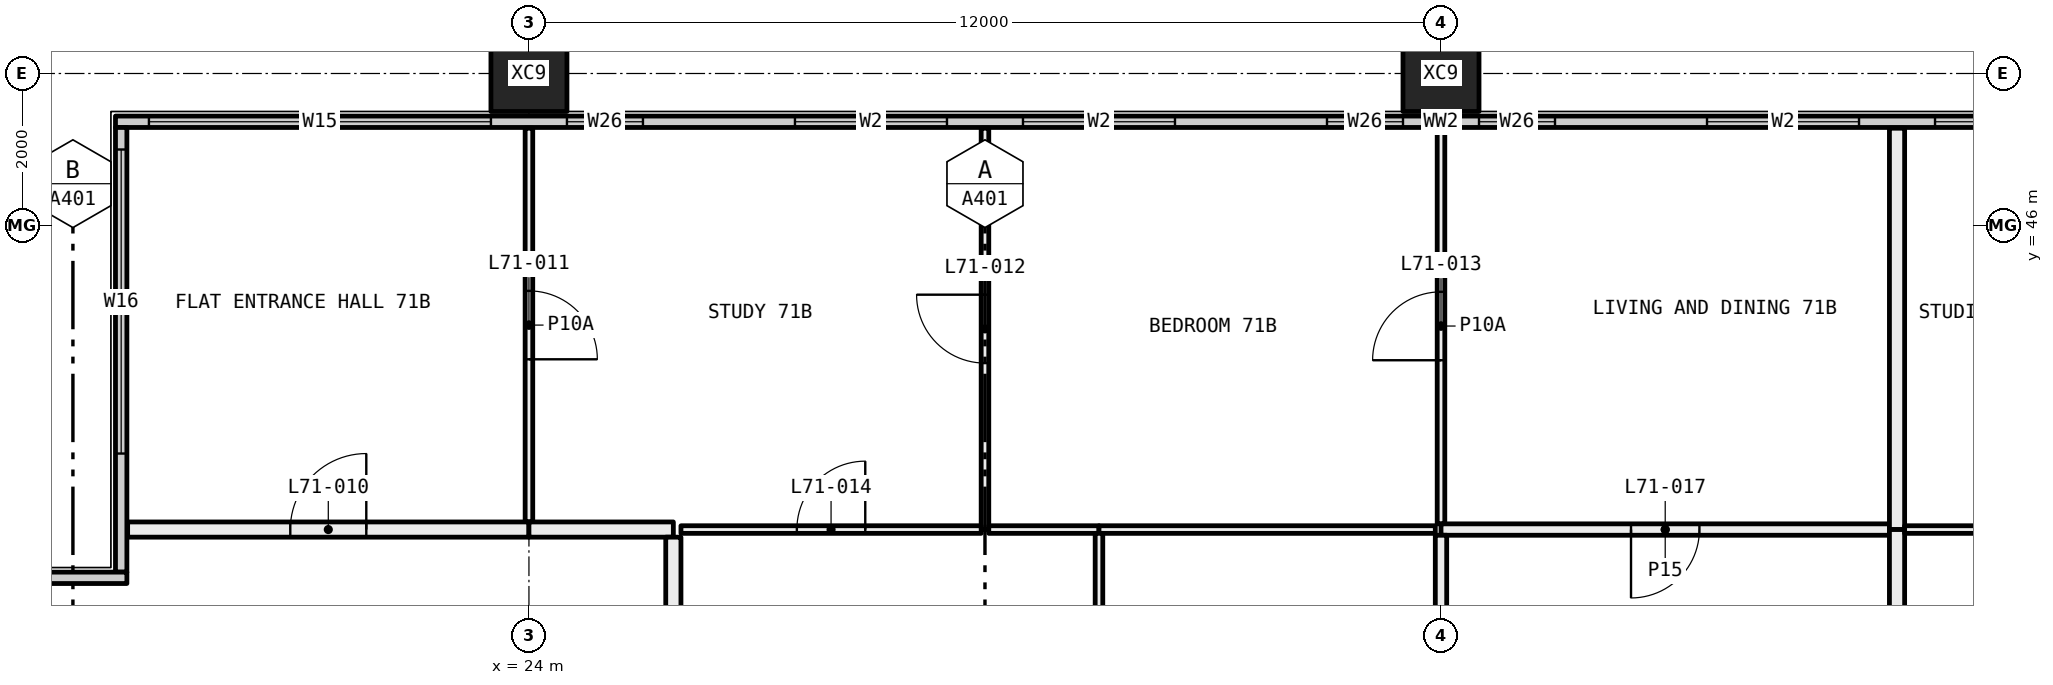
"""IFC4 building model, lengths in metres.
Left out: names, types, materials, properties, quantities, classifications, styles, units other than length and angle.
Written with IfcOpenShell. Run it as: python <this file> out.ifc"""

import sys

from ifc_helpers import new_model, si_unit, direction, frame, frame_2d, origin, origin_2d, place, context, subcontext, project, spatial, rectangle, hollow_rectangle, extrude, element, fill, save


model = new_model("IFC4")
c1 = context("Model", 3, precision=1e-05, world=origin(), true_north=direction((0.0, 1.0)))
c2 = subcontext(c1, "Body", "Model", "MODEL_VIEW")
j1 = project(units=[si_unit("LENGTHUNIT", "METRE"), si_unit("PLANEANGLEUNIT", "RADIAN")], contexts=[c1])
p1 = place(None, origin())
s1 = spatial("IfcSite", under=j1, at=p1, CompositionType="ELEMENT")
p2 = place(p1, origin())
s2 = spatial("IfcBuilding", under=s1, at=p2, CompositionType="ELEMENT")
p3 = place(p2, frame((0.0, 0.0, 262.8)))
s3 = spatial("IfcBuildingStorey", under=s2, at=p3, CompositionType="ELEMENT", Elevation=262.8)
for number, where, z_axis, x_axis in (
    (1, (24.0, 48.0, -0.4), (0.0, 0.0, 1.0), (1.0, 0.0, 0.0)),
    (2, (36.0, 48.0, -0.4), (0.0, 0.0, 1.0), (1.0, 0.0, 0.0)),
):
    element("IfcColumn", number, at=place(p3, frame(where, z_axis=z_axis, x_axis=x_axis)), inside=s3, PredefinedType="COLUMN", context=c2, shape_type="SweptSolid", body=[
        extrude(hollow_rectangle(XDim=1.0, YDim=1.0, WallThickness=0.036, at=origin_2d()), origin(), (0.0, 0.0, 1.0), 3.45),
    ])
p4 = place(p3, frame((18.56, 47.365, 0.0), z_axis=(0.0, 0.0, 1.0), x_axis=(1.0, 0.0, 0.0)))
e3 = element("IfcWall", 3, at=p4, inside=s3, PredefinedType="ELEMENTEDWALL", context=c2, shape_type="SweptSolid", body=[
    extrude(rectangle(XDim=34.88, YDim=0.15, at=frame_2d((17.44, 0.0))), origin(), (0.0, 0.0, 1.0), 3.05),
])
p5 = place(p4, frame((0.44, 0.0, 0.45)))
e4 = element("IfcOpeningElement", 4, at=p5, cuts=e3, PredefinedType="OPENING", context=c2, shape_type="SweptSolid", body=[
    extrude(rectangle(XDim=4.5, YDim=2.55, at=frame_2d((2.25, 1.275))), frame((0.0, 0.085, 0.0), z_axis=(0.0, -1.0, 0.0), x_axis=(1.0, 0.0, 0.0)), (0.0, 0.0, 1.0), 0.17),
])
p6 = place(p4, frame((5.94, 0.0, 0.45)))
e5 = element("IfcOpeningElement", 5, at=p6, cuts=e3, PredefinedType="OPENING", context=c2, shape_type="SweptSolid", body=[
    extrude(rectangle(XDim=1.0, YDim=2.55, at=frame_2d((0.5, 1.275))), frame((0.0, 0.085, 0.0), z_axis=(0.0, -1.0, 0.0), x_axis=(1.0, 0.0, 0.0)), (0.0, 0.0, 1.0), 0.17),
])
p7 = place(p4, frame((8.94, 0.0, 0.45)))
e6 = element("IfcOpeningElement", 6, at=p7, cuts=e3, PredefinedType="OPENING", context=c2, shape_type="SweptSolid", body=[
    extrude(rectangle(XDim=2.0, YDim=2.55, at=frame_2d((1.0, 1.275))), frame((0.0, 0.085, 0.0), z_axis=(0.0, -1.0, 0.0), x_axis=(1.0, 0.0, 0.0)), (0.0, 0.0, 1.0), 0.17),
])
p8 = place(p4, frame((11.94, 0.0, 0.45)))
e7 = element("IfcOpeningElement", 7, at=p8, cuts=e3, PredefinedType="OPENING", context=c2, shape_type="SweptSolid", body=[
    extrude(rectangle(XDim=2.0, YDim=2.55, at=frame_2d((1.0, 1.275))), frame((0.0, 0.085, 0.0), z_axis=(0.0, -1.0, 0.0), x_axis=(1.0, 0.0, 0.0)), (0.0, 0.0, 1.0), 0.17),
])
p9 = place(p4, frame((15.94, 0.0, 0.45)))
e8 = element("IfcOpeningElement", 8, at=p9, cuts=e3, PredefinedType="OPENING", context=c2, shape_type="SweptSolid", body=[
    extrude(rectangle(XDim=1.0, YDim=2.55, at=frame_2d((0.5, 1.275))), frame((0.0, 0.085, 0.0), z_axis=(0.0, -1.0, 0.0), x_axis=(1.0, 0.0, 0.0)), (0.0, 0.0, 1.0), 0.17),
])
p10 = place(p4, frame((17.94, 0.0, 0.45)))
e9 = element("IfcOpeningElement", 9, at=p10, cuts=e3, PredefinedType="OPENING", context=c2, shape_type="SweptSolid", body=[
    extrude(rectangle(XDim=1.0, YDim=2.55, at=frame_2d((0.5, 1.275))), frame((0.0, 0.085, 0.0), z_axis=(0.0, -1.0, 0.0), x_axis=(1.0, 0.0, 0.0)), (0.0, 0.0, 1.0), 0.17),
])
p11 = place(p4, frame((20.94, 0.0, 0.45)))
e10 = element("IfcOpeningElement", 10, at=p11, cuts=e3, PredefinedType="OPENING", context=c2, shape_type="SweptSolid", body=[
    extrude(rectangle(XDim=2.0, YDim=2.55, at=frame_2d((1.0, 1.275))), frame((0.0, 0.085, 0.0), z_axis=(0.0, -1.0, 0.0), x_axis=(1.0, 0.0, 0.0)), (0.0, 0.0, 1.0), 0.17),
])
p12 = place(p4, frame((23.94, 0.0, 0.45)))
e11 = element("IfcOpeningElement", 11, at=p12, cuts=e3, PredefinedType="OPENING", context=c2, shape_type="SweptSolid", body=[
    extrude(rectangle(XDim=2.0, YDim=2.55, at=frame_2d((1.0, 1.275))), frame((0.0, 0.085, 0.0), z_axis=(0.0, -1.0, 0.0), x_axis=(1.0, 0.0, 0.0)), (0.0, 0.0, 1.0), 0.17),
])
p13 = place(p4, frame((27.94, 0.0, 0.45)))
e12 = element("IfcOpeningElement", 12, at=p13, cuts=e3, PredefinedType="OPENING", context=c2, shape_type="SweptSolid", body=[
    extrude(rectangle(XDim=1.0, YDim=2.55, at=frame_2d((0.5, 1.275))), frame((0.0, 0.085, 0.0), z_axis=(0.0, -1.0, 0.0), x_axis=(1.0, 0.0, 0.0)), (0.0, 0.0, 1.0), 0.17),
])
p14 = place(p4, frame((29.94, 0.0, 0.45)))
e13 = element("IfcOpeningElement", 13, at=p14, cuts=e3, PredefinedType="OPENING", context=c2, shape_type="SweptSolid", body=[
    extrude(rectangle(XDim=4.5, YDim=2.55, at=frame_2d((2.25, 1.275))), frame((0.0, 0.085, 0.0), z_axis=(0.0, -1.0, 0.0), x_axis=(1.0, 0.0, 0.0)), (0.0, 0.0, 1.0), 0.17),
])
p15 = place(p3, frame((18.635, 41.44, 0.0), z_axis=(0.0, 0.0, 1.0), x_axis=(0.0, 1.0, 0.0)))
e14 = element("IfcWall", 14, at=p15, inside=s3, PredefinedType="ELEMENTEDWALL", context=c2, shape_type="SweptSolid", body=[
    extrude(rectangle(XDim=5.85, YDim=0.15, at=frame_2d((2.925, 0.0))), origin(), (0.0, 0.0, 1.0), 3.05),
])
p16 = place(p15, frame((1.56, 0.0, 0.45)))
e15 = element("IfcOpeningElement", 15, at=p16, cuts=e14, PredefinedType="OPENING", context=c2, shape_type="SweptSolid", body=[
    extrude(rectangle(XDim=4.0, YDim=2.55, at=frame_2d((2.0, 1.275))), frame((0.0, 0.085, 0.0), z_axis=(0.0, -1.0, 0.0), x_axis=(1.0, 0.0, 0.0)), (0.0, 0.0, 1.0), 0.17),
])
p17 = place(p3, frame((12.56, 41.365, 0.0), z_axis=(0.0, 0.0, 1.0), x_axis=(1.0, 0.0, 0.0)))
e16 = element("IfcWall", 16, at=p17, inside=s3, PredefinedType="ELEMENTEDWALL", context=c2, shape_type="SweptSolid", body=[
    extrude(rectangle(XDim=6.15, YDim=0.15, at=frame_2d((3.075, 0.0))), origin(), (0.0, 0.0, 1.0), 3.05),
])
p18 = place(p17, frame((0.44, 0.0, 0.45)))
e17 = element("IfcOpeningElement", 17, at=p18, cuts=e16, PredefinedType="OPENING", context=c2, shape_type="SweptSolid", body=[
    extrude(rectangle(XDim=4.0, YDim=2.55, at=frame_2d((2.0, 1.275))), frame((0.0, 0.085, 0.0), z_axis=(0.0, -1.0, 0.0), x_axis=(1.0, 0.0, 0.0)), (0.0, 0.0, 1.0), 0.17),
])
p19 = place(p3, frame((24.0, 42.1, 0.0), z_axis=(0.0, 0.0, 1.0), x_axis=(0.0, 1.0, 0.0)))
e18 = element("IfcWall", 18, at=p19, inside=s3, PredefinedType="PARTITIONING", context=c2, shape_type="SweptSolid", body=[
    extrude(rectangle(XDim=5.18, YDim=0.1, at=frame_2d((2.59, 0.0))), origin(), (0.0, 0.0, 1.0), 3.05),
])
p20 = place(p19, frame((2.14, 0.0, 0.0)))
e19 = element("IfcOpeningElement", 19, at=p20, cuts=e18, PredefinedType="OPENING", context=c2, shape_type="SweptSolid", body=[
    extrude(rectangle(XDim=0.9, YDim=2.1, at=frame_2d((0.45, 1.05))), frame((0.0, 0.06, 0.0), z_axis=(0.0, -1.0, 0.0), x_axis=(1.0, 0.0, 0.0)), (0.0, 0.0, 1.0), 0.12),
])
p21 = place(p3, frame((18.72, 42.0, 0.0), z_axis=(0.0, 0.0, 1.0), x_axis=(1.0, 0.0, 0.0)))
e20 = element("IfcWall", 20, at=p21, inside=s3, PredefinedType="PARTITIONING", context=c2, shape_type="SweptSolid", body=[
    extrude(rectangle(XDim=5.28, YDim=0.2, at=frame_2d((2.64, 0.0))), origin(), (0.0, 0.0, 1.0), 3.05),
])
p22 = place(p21, frame((2.14, 0.0, 0.0)))
e21 = element("IfcOpeningElement", 21, at=p22, cuts=e20, PredefinedType="OPENING", context=c2, shape_type="SweptSolid", body=[
    extrude(rectangle(XDim=1.0, YDim=2.1, at=frame_2d((0.5, 1.05))), frame((0.0, 0.11, 0.0), z_axis=(0.0, -1.0, 0.0), x_axis=(1.0, 0.0, 0.0)), (0.0, 0.0, 1.0), 0.22),
])
p23 = place(p3, frame((30.0, 42.0, 0.0), z_axis=(0.0, 0.0, 1.0), x_axis=(0.0, 1.0, 0.0)))
e22 = element("IfcWall", 22, at=p23, inside=s3, PredefinedType="PARTITIONING", context=c2, shape_type="SweptSolid", body=[
    extrude(rectangle(XDim=5.28, YDim=0.1, at=frame_2d((2.64, 0.0))), origin(), (0.0, 0.0, 1.0), 3.05),
])
p24 = place(p23, frame((2.19, 0.0, 0.0)))
e23 = element("IfcOpeningElement", 23, at=p24, cuts=e22, PredefinedType="OPENING", context=c2, shape_type="SweptSolid", body=[
    extrude(rectangle(XDim=0.9, YDim=2.1, at=frame_2d((0.45, 1.05))), frame((0.0, 0.06, 0.0), z_axis=(0.0, -1.0, 0.0), x_axis=(1.0, 0.0, 0.0)), (0.0, 0.0, 1.0), 0.12),
])
p25 = place(p3, frame((26.0, 42.0, 0.0), z_axis=(0.0, 0.0, 1.0), x_axis=(1.0, 0.0, 0.0)))
e24 = element("IfcWall", 24, at=p25, inside=s3, PredefinedType="PARTITIONING", context=c2, shape_type="SweptSolid", body=[
    extrude(rectangle(XDim=3.95, YDim=0.1, at=frame_2d((1.975, 0.0))), origin(), (0.0, 0.0, 1.0), 3.05),
])
p26 = place(p25, frame((1.525, 0.0, 0.0)))
e25 = element("IfcOpeningElement", 25, at=p26, cuts=e24, PredefinedType="OPENING", context=c2, shape_type="SweptSolid", body=[
    extrude(rectangle(XDim=0.9, YDim=2.1, at=frame_2d((0.45, 1.05))), frame((0.0, 0.06, 0.0), z_axis=(0.0, -1.0, 0.0), x_axis=(1.0, 0.0, 0.0)), (0.0, 0.0, 1.0), 0.12),
])
p27 = place(p3, frame((24.0, 42.0, 0.0), z_axis=(0.0, 0.0, 1.0), x_axis=(1.0, 0.0, 0.0)))
e26 = element("IfcWall", 26, at=p27, inside=s3, PredefinedType="PARTITIONING", context=c2, shape_type="SweptSolid", body=[
    extrude(rectangle(XDim=1.9, YDim=0.2, at=frame_2d((0.95, 0.0))), origin(), (0.0, 0.0, 1.0), 3.05),
])
p28 = place(p3, frame((36.0, 42.075, 0.0), z_axis=(0.0, 0.0, 1.0), x_axis=(0.0, 1.0, 0.0)))
e27 = element("IfcWall", 27, at=p28, inside=s3, PredefinedType="PARTITIONING", context=c2, shape_type="SweptSolid", body=[
    extrude(rectangle(XDim=5.205, YDim=0.1, at=frame_2d((2.603, 0.0))), origin(), (0.0, 0.0, 1.0), 2.45),
])
p29 = place(p28, frame((2.153, 0.0, 0.0)))
e28 = element("IfcOpeningElement", 28, at=p29, cuts=e27, PredefinedType="OPENING", context=c2, shape_type="SweptSolid", body=[
    extrude(rectangle(XDim=0.9, YDim=2.1, at=frame_2d((0.45, 1.05))), frame((0.0, 0.06, 0.0), z_axis=(0.0, -1.0, 0.0), x_axis=(1.0, 0.0, 0.0)), (0.0, 0.0, 1.0), 0.12),
])
p30 = place(p3, frame((30.05, 42.0, 0.0), z_axis=(0.0, 0.0, 1.0), x_axis=(1.0, 0.0, 0.0)))
e29 = element("IfcWall", 29, at=p30, inside=s3, PredefinedType="PARTITIONING", context=c2, shape_type="SweptSolid", body=[
    extrude(rectangle(XDim=1.45, YDim=0.1, at=frame_2d((0.725, 0.0))), origin(), (0.0, 0.0, 1.0), 3.05),
])
p31 = place(p3, frame((31.5, 42.0, 0.0), z_axis=(0.0, 0.0, 1.0), x_axis=(1.0, 0.0, 0.0)))
e30 = element("IfcWall", 30, at=p31, inside=s3, PredefinedType="PARTITIONING", context=c2, shape_type="SweptSolid", body=[
    extrude(rectangle(XDim=4.425, YDim=0.1, at=frame_2d((2.212, 0.0))), origin(), (0.0, 0.0, 1.0), 2.45),
])
p32 = place(p3, frame((36.0, 42.0, 0.0), z_axis=(0.0, 0.0, 1.0), x_axis=(1.0, 0.0, 0.0)))
e31 = element("IfcWall", 31, at=p32, inside=s3, PredefinedType="PARTITIONING", context=c2, shape_type="SweptSolid", body=[
    extrude(rectangle(XDim=5.9, YDim=0.15, at=frame_2d((2.95, 0.0))), origin(), (0.0, 0.0, 1.0), 2.45),
])
p33 = place(p32, frame((2.5, 0.0, 0.0)))
e32 = element("IfcOpeningElement", 32, at=p33, cuts=e31, PredefinedType="OPENING", context=c2, shape_type="SweptSolid", body=[
    extrude(rectangle(XDim=0.9, YDim=2.1, at=frame_2d((0.45, 1.05))), frame((0.0, 0.085, 0.0), z_axis=(0.0, -1.0, 0.0), x_axis=(1.0, 0.0, 0.0)), (0.0, 0.0, 1.0), 0.17),
])
p34 = place(p3, frame((42.0, 42.0, 0.0), z_axis=(0.0, 0.0, 1.0), x_axis=(0.0, 1.0, 0.0)))
e33 = element("IfcWall", 33, at=p34, inside=s3, PredefinedType="PARTITIONING", context=c2, shape_type="SweptSolid", body=[
    extrude(rectangle(XDim=5.28, YDim=0.2, at=frame_2d((2.64, 0.0))), origin(), (0.0, 0.0, 1.0), 3.05),
])
p35 = place(p3, frame((31.5, 36.1, 0.0), z_axis=(0.0, 0.0, 1.0), x_axis=(0.0, 1.0, 0.0)))
e34 = element("IfcWall", 34, at=p35, inside=s3, PredefinedType="PARTITIONING", context=c2, shape_type="SweptSolid", body=[
    extrude(rectangle(XDim=5.85, YDim=0.1, at=frame_2d((2.925, 0.0))), origin(), (0.0, 0.0, 1.0), 3.05),
])
p36 = place(p35, frame((2.475, 0.0, 0.0)))
e35 = element("IfcOpeningElement", 35, at=p36, cuts=e34, PredefinedType="OPENING", context=c2, shape_type="SweptSolid", body=[
    extrude(rectangle(XDim=0.9, YDim=2.1, at=frame_2d((0.45, 1.05))), frame((0.0, 0.06, 0.0), z_axis=(0.0, -1.0, 0.0), x_axis=(1.0, 0.0, 0.0)), (0.0, 0.0, 1.0), 0.12),
])
p37 = place(p3, frame((25.9, 41.9, 0.0), z_axis=(0.0, 0.0, 1.0), x_axis=(0.0, -1.0, 0.0)))
e36 = element("IfcWall", 36, at=p37, inside=s3, PredefinedType="PARTITIONING", context=c2, shape_type="SweptSolid", body=[
    extrude(rectangle(XDim=6.2, YDim=0.2, at=frame_2d((3.1, 0.0))), origin(), (0.0, 0.0, 1.0), 2.45),
])
p38 = place(p3, frame((36.0, 38.1, 0.0), z_axis=(0.0, 0.0, 1.0), x_axis=(0.0, 1.0, 0.0)))
e37 = element("IfcWall", 37, at=p38, inside=s3, PredefinedType="PARTITIONING", context=c2, shape_type="SweptSolid", body=[
    extrude(rectangle(XDim=3.825, YDim=0.15, at=frame_2d((1.913, 0.0))), origin(), (0.0, 0.0, 1.0), 2.45),
])
p39 = place(p3, frame((42.0, 38.1, 0.0), z_axis=(0.0, 0.0, 1.0), x_axis=(0.0, 1.0, 0.0)))
e38 = element("IfcWall", 38, at=p39, inside=s3, PredefinedType="PARTITIONING", context=c2, shape_type="SweptSolid", body=[
    extrude(rectangle(XDim=3.9, YDim=0.2, at=frame_2d((1.95, 0.0))), origin(), (0.0, 0.0, 1.0), 3.05),
])
p40 = place(p3, frame((42.1, 42.0, 0.0), z_axis=(0.0, 0.0, 1.0), x_axis=(1.0, 0.0, 0.0)))
e39 = element("IfcWall", 39, at=p40, inside=s3, PredefinedType="PARTITIONING", context=c2, shape_type="SweptSolid", body=[
    extrude(rectangle(XDim=3.9, YDim=0.1, at=frame_2d((1.95, 0.0))), origin(), (0.0, 0.0, 1.0), 3.05),
])
p41 = place(p40, frame((1.5, 0.0, 0.0)))
e40 = element("IfcOpeningElement", 40, at=p41, cuts=e39, PredefinedType="OPENING", context=c2, shape_type="SweptSolid", body=[
    extrude(rectangle(XDim=0.9, YDim=2.1, at=frame_2d((0.45, 1.05))), frame((0.0, 0.06, 0.0), z_axis=(0.0, -1.0, 0.0), x_axis=(1.0, 0.0, 0.0)), (0.0, 0.0, 1.0), 0.12),
])
p42 = place(p5, origin())
e41 = element("IfcWindow", 41, at=p42, inside=s3, PartitioningType="SINGLE_PANEL", PredefinedType="WINDOW", context=c2, shape_type="SweptSolid", body=[
    extrude(rectangle(XDim=4.5, YDim=2.55, at=frame_2d((2.25, 1.275))), frame((0.0, 0.03, 0.0), z_axis=(0.0, -1.0, 0.0), x_axis=(1.0, 0.0, 0.0)), (0.0, 0.0, 1.0), 0.06),
])
fill(e4, e41)
p43 = place(p6, origin())
e42 = element("IfcWindow", 42, at=p43, inside=s3, PartitioningType="SINGLE_PANEL", PredefinedType="WINDOW", context=c2, shape_type="SweptSolid", body=[
    extrude(rectangle(XDim=1.0, YDim=2.55, at=frame_2d((0.5, 1.275))), frame((0.0, 0.03, 0.0), z_axis=(0.0, -1.0, 0.0), x_axis=(1.0, 0.0, 0.0)), (0.0, 0.0, 1.0), 0.06),
])
fill(e5, e42)
p44 = place(p7, origin())
e43 = element("IfcWindow", 43, at=p44, inside=s3, PartitioningType="SINGLE_PANEL", PredefinedType="WINDOW", context=c2, shape_type="SweptSolid", body=[
    extrude(rectangle(XDim=2.0, YDim=2.55, at=frame_2d((1.0, 1.275))), frame((0.0, 0.03, 0.0), z_axis=(0.0, -1.0, 0.0), x_axis=(1.0, 0.0, 0.0)), (0.0, 0.0, 1.0), 0.06),
])
fill(e6, e43)
p45 = place(p8, origin())
e44 = element("IfcWindow", 44, at=p45, inside=s3, PartitioningType="SINGLE_PANEL", PredefinedType="WINDOW", context=c2, shape_type="SweptSolid", body=[
    extrude(rectangle(XDim=2.0, YDim=2.55, at=frame_2d((1.0, 1.275))), frame((0.0, 0.03, 0.0), z_axis=(0.0, -1.0, 0.0), x_axis=(1.0, 0.0, 0.0)), (0.0, 0.0, 1.0), 0.06),
])
fill(e7, e44)
p46 = place(p9, origin())
e45 = element("IfcWindow", 45, at=p46, inside=s3, PartitioningType="SINGLE_PANEL", PredefinedType="WINDOW", context=c2, shape_type="SweptSolid", body=[
    extrude(rectangle(XDim=1.0, YDim=2.55, at=frame_2d((0.5, 1.275))), frame((0.0, 0.03, 0.0), z_axis=(0.0, -1.0, 0.0), x_axis=(1.0, 0.0, 0.0)), (0.0, 0.0, 1.0), 0.06),
])
fill(e8, e45)
p47 = place(p10, origin())
e46 = element("IfcWindow", 46, at=p47, inside=s3, PartitioningType="SINGLE_PANEL", PredefinedType="WINDOW", context=c2, shape_type="SweptSolid", body=[
    extrude(rectangle(XDim=1.0, YDim=2.55, at=frame_2d((0.5, 1.275))), frame((0.0, 0.03, 0.0), z_axis=(0.0, -1.0, 0.0), x_axis=(1.0, 0.0, 0.0)), (0.0, 0.0, 1.0), 0.06),
])
fill(e9, e46)
p48 = place(p11, origin())
e47 = element("IfcWindow", 47, at=p48, inside=s3, PartitioningType="SINGLE_PANEL", PredefinedType="WINDOW", context=c2, shape_type="SweptSolid", body=[
    extrude(rectangle(XDim=2.0, YDim=2.55, at=frame_2d((1.0, 1.275))), frame((0.0, 0.03, 0.0), z_axis=(0.0, -1.0, 0.0), x_axis=(1.0, 0.0, 0.0)), (0.0, 0.0, 1.0), 0.06),
])
fill(e10, e47)
p49 = place(p12, origin())
e48 = element("IfcWindow", 48, at=p49, inside=s3, PartitioningType="SINGLE_PANEL", PredefinedType="WINDOW", context=c2, shape_type="SweptSolid", body=[
    extrude(rectangle(XDim=2.0, YDim=2.55, at=frame_2d((1.0, 1.275))), frame((0.0, 0.03, 0.0), z_axis=(0.0, -1.0, 0.0), x_axis=(1.0, 0.0, 0.0)), (0.0, 0.0, 1.0), 0.06),
])
fill(e11, e48)
p50 = place(p16, origin())
e49 = element("IfcWindow", 49, at=p50, inside=s3, PartitioningType="SINGLE_PANEL", PredefinedType="WINDOW", context=c2, shape_type="SweptSolid", body=[
    extrude(rectangle(XDim=4.0, YDim=2.55, at=frame_2d((2.0, 1.275))), frame((0.0, 0.03, 0.0), z_axis=(0.0, -1.0, 0.0), x_axis=(1.0, 0.0, 0.0)), (0.0, 0.0, 1.0), 0.06),
])
fill(e15, e49)
p51 = place(p22, origin())
e50 = element("IfcDoor", 50, at=p51, inside=s3, OperationType="SINGLE_SWING_LEFT", PredefinedType="DOOR", context=c2, shape_type="SweptSolid", body=[
    extrude(rectangle(XDim=1.0, YDim=2.1, at=frame_2d((0.5, 1.05))), frame((0.0, 0.025, 0.0), z_axis=(0.0, -1.0, 0.0), x_axis=(1.0, 0.0, 0.0)), (0.0, 0.0, 1.0), 0.05),
])
fill(e21, e50)
p52 = place(p20, frame((0.9, 0.0, 0.0), x_axis=(-1.0, 0.0, 0.0)))
e51 = element("IfcDoor", 51, at=p52, inside=s3, OperationType="SINGLE_SWING_LEFT", PredefinedType="DOOR", context=c2, shape_type="SweptSolid", body=[
    extrude(rectangle(XDim=0.9, YDim=2.1, at=frame_2d((0.45, 1.05))), frame((0.0, 0.025, 0.0), z_axis=(0.0, -1.0, 0.0), x_axis=(1.0, 0.0, 0.0)), (0.0, 0.0, 1.0), 0.05),
])
fill(e19, e51)
p53 = place(p24, origin())
e52 = element("IfcDoor", 52, at=p53, inside=s3, OperationType="SINGLE_SWING_LEFT", PredefinedType="DOOR", context=c2, shape_type="SweptSolid", body=[
    extrude(rectangle(XDim=0.9, YDim=2.1, at=frame_2d((0.45, 1.05))), frame((0.0, 0.025, 0.0), z_axis=(0.0, -1.0, 0.0), x_axis=(1.0, 0.0, 0.0)), (0.0, 0.0, 1.0), 0.05),
])
fill(e23, e52)
p54 = place(p29, origin())
e53 = element("IfcDoor", 53, at=p54, inside=s3, OperationType="SINGLE_SWING_RIGHT", PredefinedType="DOOR", context=c2, shape_type="SweptSolid", body=[
    extrude(rectangle(XDim=0.9, YDim=2.1, at=frame_2d((0.45, 1.05))), frame((0.0, 0.025, 0.0), z_axis=(0.0, -1.0, 0.0), x_axis=(1.0, 0.0, 0.0)), (0.0, 0.0, 1.0), 0.05),
])
fill(e28, e53)
p55 = place(p26, origin())
e54 = element("IfcDoor", 54, at=p55, inside=s3, OperationType="SINGLE_SWING_LEFT", PredefinedType="DOOR", context=c2, shape_type="SweptSolid", body=[
    extrude(rectangle(XDim=0.9, YDim=2.1, at=frame_2d((0.45, 1.05))), frame((0.0, 0.025, 0.0), z_axis=(0.0, -1.0, 0.0), x_axis=(1.0, 0.0, 0.0)), (0.0, 0.0, 1.0), 0.05),
])
fill(e25, e54)
p56 = place(p33, frame((0.9, 0.0, 0.0), x_axis=(-1.0, 0.0, 0.0)))
e55 = element("IfcDoor", 55, at=p56, inside=s3, OperationType="SINGLE_SWING_LEFT", PredefinedType="DOOR", context=c2, shape_type="SweptSolid", body=[
    extrude(rectangle(XDim=0.9, YDim=2.1, at=frame_2d((0.45, 1.05))), frame((0.0, 0.025, 0.0), z_axis=(0.0, -1.0, 0.0), x_axis=(1.0, 0.0, 0.0)), (0.0, 0.0, 1.0), 0.05),
])
fill(e32, e55)
save(model, sys.argv[1])
